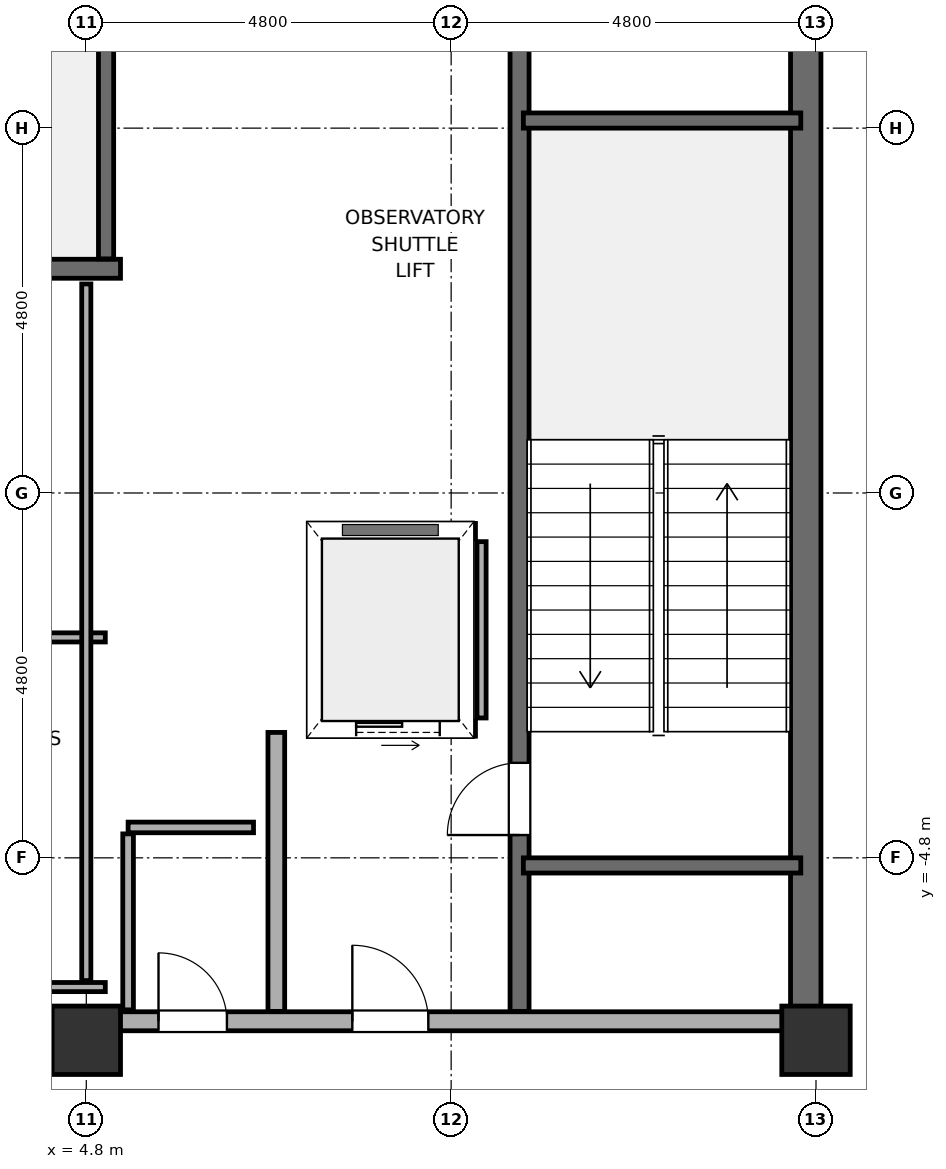
"""IFC4 building model, lengths in metres.
Left out: names, types, materials, properties, quantities, classifications, styles, units other than length and angle.
Written with IfcOpenShell. Run it as: python <this file> out.ifc"""

import sys

from ifc_helpers import new_model, si_unit, direction, frame, frame_2d, origin, origin_2d, place, context, subcontext, project, spatial, rectangle, hollow_rectangle, extrude, element, fill, save


model = new_model("IFC4")
c1 = context("Model", 3, precision=1e-05, world=origin(), true_north=direction((0.0, 1.0)))
c2 = subcontext(c1, "Body", "Model", "MODEL_VIEW")
j1 = project(units=[si_unit("LENGTHUNIT", "METRE"), si_unit("PLANEANGLEUNIT", "RADIAN")], contexts=[c1])
p1 = place(None, origin())
s1 = spatial("IfcSite", under=j1, at=p1, CompositionType="ELEMENT")
p2 = place(p1, origin())
s2 = spatial("IfcBuilding", under=s1, at=p2, CompositionType="ELEMENT")
p3 = place(p2, frame((0.0, 0.0, -10.2)))
s3 = spatial("IfcBuildingStorey", under=s2, at=p3, CompositionType="ELEMENT", Elevation=-10.2)
for number, where, z_axis, x_axis in (
    (1, (4.8, -7.2, -0.25), (0.0, 0.0, 1.0), (1.0, 0.0, 0.0)),
    (2, (14.4, -7.2, -0.25), (0.0, 0.0, 1.0), (1.0, 0.0, 0.0)),
):
    element("IfcColumn", number, at=place(p3, frame(where, z_axis=z_axis, x_axis=x_axis)), inside=s3, PredefinedType="COLUMN", context=c2, shape_type="SweptSolid", body=[
        extrude(hollow_rectangle(XDim=0.9, YDim=0.9, WallThickness=0.04, at=origin_2d()), origin(), (0.0, 0.0, 1.0), 5.05),
    ])
p4 = place(p3, frame((14.265, -7.2, -0.25), z_axis=(0.0, 0.0, 1.0), x_axis=(0.0, 1.0, 0.0)))
e3 = element("IfcWall", 3, at=p4, inside=s3, PredefinedType="SHEAR", context=c2, shape_type="SweptSolid", body=[
    extrude(rectangle(XDim=14.4, YDim=0.4, at=frame_2d((7.2, 0.0))), origin(), (0.0, 0.0, 1.0), 4.8),
])
p5 = place(p3, frame((-4.6, -6.95, 0.0), z_axis=(0.0, 0.0, 1.0), x_axis=(1.0, 0.0, 0.0)))
e4 = element("IfcWall", 4, at=p5, inside=s3, PredefinedType="SOLIDWALL", context=c2, shape_type="SweptSolid", body=[
    extrude(rectangle(XDim=9.2, YDim=0.25, at=frame_2d((4.6, 0.0))), origin(), (0.0, 0.0, 1.0), 3.35),
])
p6 = place(p5, frame((0.8, 0.0, 0.0)))
e5 = element("IfcOpeningElement", 5, at=p6, cuts=e4, PredefinedType="OPENING", context=c2, shape_type="SweptSolid", body=[
    extrude(rectangle(XDim=1.2, YDim=2.2, at=frame_2d((0.6, 1.1))), frame((0.0, 0.14, 0.0), z_axis=(0.0, -1.0, 0.0), x_axis=(1.0, 0.0, 0.0)), (0.0, 0.0, 1.0), 0.28),
])
p7 = place(p5, frame((5.55, 0.0, 0.0)))
e6 = element("IfcOpeningElement", 6, at=p7, cuts=e4, PredefinedType="OPENING", context=c2, shape_type="SweptSolid", body=[
    extrude(rectangle(XDim=1.2, YDim=2.2, at=frame_2d((0.6, 1.1))), frame((0.0, 0.14, 0.0), z_axis=(0.0, -1.0, 0.0), x_axis=(1.0, 0.0, 0.0)), (0.0, 0.0, 1.0), 0.28),
])
p8 = place(p3, frame((4.8, -6.95, 0.0), z_axis=(0.0, 0.0, 1.0), x_axis=(1.0, 0.0, 0.0)))
e7 = element("IfcWall", 7, at=p8, inside=s3, PredefinedType="SOLIDWALL", context=c2, shape_type="SweptSolid", body=[
    extrude(rectangle(XDim=9.4, YDim=0.25, at=frame_2d((4.7, 0.0))), origin(), (0.0, 0.0, 1.0), 3.55),
])
p9 = place(p8, frame((3.5, 0.0, 0.0)))
e8 = element("IfcOpeningElement", 8, at=p9, cuts=e7, PredefinedType="OPENING", context=c2, shape_type="SweptSolid", body=[
    extrude(rectangle(XDim=1.0, YDim=2.15, at=frame_2d((0.5, 1.075))), frame((0.0, 0.14, 0.0), z_axis=(0.0, -1.0, 0.0), x_axis=(1.0, 0.0, 0.0)), (0.0, 0.0, 1.0), 0.28),
])
p10 = place(p8, frame((0.95, 0.0, 0.0)))
e9 = element("IfcOpeningElement", 9, at=p10, cuts=e7, PredefinedType="OPENING", context=c2, shape_type="SweptSolid", body=[
    extrude(rectangle(XDim=0.9, YDim=2.1, at=frame_2d((0.45, 1.05))), frame((0.0, 0.14, 0.0), z_axis=(0.0, -1.0, 0.0), x_axis=(1.0, 0.0, 0.0)), (0.0, 0.0, 1.0), 0.28),
])
p11 = place(p3, frame((7.3, -6.82, 0.0), z_axis=(0.0, 0.0, 1.0), x_axis=(0.0, 1.0, 0.0)))
e10 = element("IfcWall", 10, at=p11, inside=s3, PredefinedType="SOLIDWALL", context=c2, shape_type="SweptSolid", body=[
    extrude(rectangle(XDim=3.67, YDim=0.22, at=frame_2d((1.835, 0.0))), origin(), (0.0, 0.0, 1.0), 3.55),
])
p12 = place(p3, frame((10.5, -6.82, -0.25), z_axis=(0.0, 0.0, 1.0), x_axis=(0.0, 1.0, 0.0)))
e11 = element("IfcWall", 11, at=p12, inside=s3, PredefinedType="SOLIDWALL", context=c2, shape_type="SweptSolid", body=[
    extrude(rectangle(XDim=13.64, YDim=0.25, at=frame_2d((6.82, 0.0))), origin(), (0.0, 0.0, 1.0), 4.8),
])
p13 = place(p12, frame((2.32, 0.0, 0.25)))
e12 = element("IfcOpeningElement", 12, at=p13, cuts=e11, PredefinedType="OPENING", context=c2, shape_type="SweptSolid", body=[
    extrude(rectangle(XDim=0.95, YDim=2.15, at=frame_2d((0.475, 1.075))), frame((0.0, 0.14, 0.0), z_axis=(0.0, -1.0, 0.0), x_axis=(1.0, 0.0, 0.0)), (0.0, 0.0, 1.0), 0.28),
])
for number, where, z_axis, x_axis in (
    (13, (10.55, -4.9, -0.25), (0.0, 0.0, 1.0), (1.0, 0.0, 0.0)),
    (14, (10.55, 4.9, -0.25), (0.0, 0.0, 1.0), (1.0, 0.0, 0.0)),
):
    element("IfcWall", number, at=place(p3, frame(where, z_axis=z_axis, x_axis=x_axis)), inside=s3, PredefinedType="SOLIDWALL", context=c2, shape_type="SweptSolid", body=[
        extrude(rectangle(XDim=3.65, YDim=0.2, at=frame_2d((1.825, 0.0))), origin(), (0.0, 0.0, 1.0), 4.8),
    ])
p14 = place(p3, frame((-4.65, 2.95, -0.25), z_axis=(0.0, 0.0, 1.0), x_axis=(1.0, 0.0, 0.0)))
e15 = element("IfcWall", 15, at=p14, inside=s3, PredefinedType="SOLIDWALL", context=c2, shape_type="SweptSolid", body=[
    extrude(rectangle(XDim=9.9, YDim=0.25, at=frame_2d((4.95, 0.0))), origin(), (0.0, 0.0, 1.0), 4.8),
])
p15 = place(p14, frame((0.65, 0.0, 0.25)))
e16 = element("IfcOpeningElement", 16, at=p15, cuts=e15, PredefinedType="OPENING", context=c2, shape_type="SweptSolid", body=[
    extrude(rectangle(XDim=0.95, YDim=2.15, at=frame_2d((0.475, 1.075))), frame((0.0, 0.14, 0.0), z_axis=(0.0, -1.0, 0.0), x_axis=(1.0, 0.0, 0.0)), (0.0, 0.0, 1.0), 0.28),
])
p16 = place(p3, frame((5.06, 3.08, -0.25), z_axis=(0.0, 0.0, 1.0), x_axis=(0.0, 1.0, 0.0)))
e17 = element("IfcWall", 17, at=p16, inside=s3, PredefinedType="SOLIDWALL", context=c2, shape_type="SweptSolid", body=[
    extrude(rectangle(XDim=3.74, YDim=0.2, at=frame_2d((1.87, 0.0))), origin(), (0.0, 0.0, 1.0), 4.8),
])
p17 = place(p3, frame((7.88, -3.1, 0.0), z_axis=(0.0, 0.0, 1.0), x_axis=(1.0, 0.0, 0.0)))
e18 = element("IfcWall", 18, at=p17, inside=s3, PredefinedType="SOLIDWALL", context=c2, shape_type="SweptSolid", body=[
    extrude(rectangle(XDim=2.04, YDim=0.2, at=frame_2d((1.02, 0.0))), origin(), (0.0, 0.0, 1.0), 4.55),
])
p18 = place(p17, frame((0.47, 0.0, 0.0)))
e19 = element("IfcOpeningElement", 19, at=p18, cuts=e18, PredefinedType="OPENING", context=c2, shape_type="SweptSolid", body=[
    extrude(rectangle(XDim=1.1, YDim=2.2, at=frame_2d((0.55, 1.1))), frame((0.0, 0.115, 0.0), z_axis=(0.0, -1.0, 0.0), x_axis=(1.0, 0.0, 0.0)), (0.0, 0.0, 1.0), 0.23),
])
p19 = place(p3, frame((7.88, -0.5, 0.0), z_axis=(0.0, 0.0, 1.0), x_axis=(1.0, 0.0, 0.0)))
e20 = element("IfcWall", 20, at=p19, inside=s3, PredefinedType="SOLIDWALL", context=c2, shape_type="SweptSolid", body=[
    extrude(rectangle(XDim=2.04, YDim=0.2, at=frame_2d((1.02, 0.0))), origin(), (0.0, 0.0, 1.0), 4.55),
])
for number, where, z_axis, x_axis in (
    (21, (7.8, -2.96, 0.0), (0.0, 0.0, 1.0), (0.0, 1.0, 0.0)),
    (22, (10.0, -2.96, 0.0), (0.0, 0.0, 1.0), (0.0, 1.0, 0.0)),
):
    element("IfcWall", number, at=place(p3, frame(where, z_axis=z_axis, x_axis=x_axis)), inside=s3, PredefinedType="PARTITIONING", context=c2, shape_type="SweptSolid", body=[
        extrude(rectangle(XDim=2.32, YDim=0.12, at=frame_2d((1.16, 0.0))), origin(), (0.0, 0.0, 1.0), 4.55),
    ])
p20 = place(p3, frame((2.6, -6.5, 0.0), z_axis=(0.0, 0.0, 1.0), x_axis=(1.0, 0.0, 0.0)))
e23 = element("IfcWall", 23, at=p20, inside=s3, PredefinedType="PARTITIONING", context=c2, shape_type="SweptSolid", body=[
    extrude(rectangle(XDim=2.45, YDim=0.12, at=frame_2d((1.225, 0.0))), origin(), (0.0, 0.0, 1.0), 4.55),
])
p21 = place(p3, frame((5.35, -4.4, 0.0), z_axis=(0.0, 0.0, 1.0), x_axis=(1.0, 0.0, 0.0)))
e24 = element("IfcWall", 24, at=p21, inside=s3, PredefinedType="PLUMBINGWALL", context=c2, shape_type="SweptSolid", body=[
    extrude(rectangle(XDim=1.65, YDim=0.14, at=frame_2d((0.825, 0.0))), origin(), (0.0, 0.0, 1.0), 4.55),
])
p22 = place(p3, frame((2.6, -1.9, 0.0), z_axis=(0.0, 0.0, 1.0), x_axis=(1.0, 0.0, 0.0)))
e25 = element("IfcWall", 25, at=p22, inside=s3, PredefinedType="PARTITIONING", context=c2, shape_type="SweptSolid", body=[
    extrude(rectangle(XDim=2.45, YDim=0.12, at=frame_2d((1.225, 0.0))), origin(), (0.0, 0.0, 1.0), 4.55),
])
p23 = place(p3, frame((4.8, -6.415, 0.0), z_axis=(0.0, 0.0, 1.0), x_axis=(0.0, 1.0, 0.0)))
e26 = element("IfcWall", 26, at=p23, inside=s3, PredefinedType="PARTITIONING", context=c2, shape_type="SweptSolid", body=[
    extrude(rectangle(XDim=9.165, YDim=0.12, at=frame_2d((4.583, 0.0))), origin(), (0.0, 0.0, 1.0), 4.55),
])
p24 = place(p3, frame((5.35, -6.8, 0.0), z_axis=(0.0, 0.0, 1.0), x_axis=(0.0, 1.0, 0.0)))
e27 = element("IfcWall", 27, at=p24, inside=s3, PredefinedType="PLUMBINGWALL", context=c2, shape_type="SweptSolid", body=[
    extrude(rectangle(XDim=2.315, YDim=0.14, at=frame_2d((1.157, 0.0))), origin(), (0.0, 0.0, 1.0), 3.55),
])
p25 = place(p9, origin())
e28 = element("IfcDoor", 28, at=p25, inside=s3, OperationType="SINGLE_SWING_LEFT", PredefinedType="DOOR", context=c2, shape_type="SweptSolid", body=[
    extrude(rectangle(XDim=1.0, YDim=2.15, at=frame_2d((0.5, 1.075))), frame((0.0, 0.025, 0.0), z_axis=(0.0, -1.0, 0.0), x_axis=(1.0, 0.0, 0.0)), (0.0, 0.0, 1.0), 0.05),
])
fill(e8, e28)
p26 = place(p13, origin())
e29 = element("IfcDoor", 29, at=p26, inside=s3, OperationType="SINGLE_SWING_LEFT", PredefinedType="DOOR", context=c2, shape_type="SweptSolid", body=[
    extrude(rectangle(XDim=0.95, YDim=2.15, at=frame_2d((0.475, 1.075))), frame((0.0, 0.025, 0.0), z_axis=(0.0, -1.0, 0.0), x_axis=(1.0, 0.0, 0.0)), (0.0, 0.0, 1.0), 0.05),
])
fill(e12, e29)
p27 = place(p18, origin())
e30 = element("IfcDoor", 30, at=p27, inside=s3, OperationType="SLIDING_TO_LEFT", PredefinedType="DOOR", context=c2, shape_type="SweptSolid", body=[
    extrude(rectangle(XDim=1.1, YDim=2.2, at=frame_2d((0.55, 1.1))), frame((0.0, 0.025, 0.0), z_axis=(0.0, -1.0, 0.0), x_axis=(1.0, 0.0, 0.0)), (0.0, 0.0, 1.0), 0.05),
])
fill(e19, e30)
p28 = place(p10, origin())
e31 = element("IfcDoor", 31, at=p28, inside=s3, OperationType="SINGLE_SWING_LEFT", PredefinedType="DOOR", context=c2, shape_type="SweptSolid", body=[
    extrude(rectangle(XDim=0.9, YDim=2.1, at=frame_2d((0.45, 1.05))), frame((0.0, 0.025, 0.0), z_axis=(0.0, -1.0, 0.0), x_axis=(1.0, 0.0, 0.0)), (0.0, 0.0, 1.0), 0.05),
])
fill(e9, e31)
save(model, sys.argv[1])
